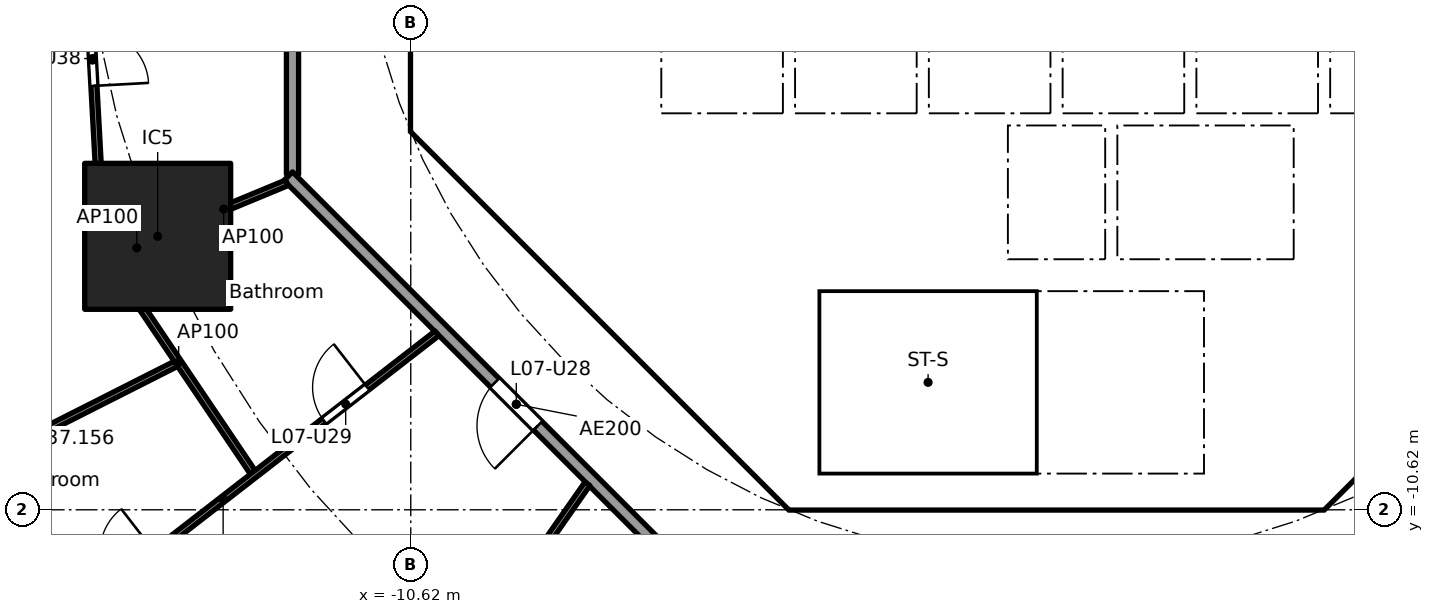
"""IFC4 building model, lengths in metres.
Left out: names, types, materials, properties, quantities, classifications, styles, units other than length and angle.
Written with IfcOpenShell. Run it as: python <this file> out.ifc"""

import sys

from ifc_helpers import new_model, si_unit, direction, frame, frame_2d, origin, origin_2d, place, context, subcontext, project, spatial, polyline, rectangle, outline, extrude, element, fill, save


model = new_model("IFC4")
c1 = context("Model", 3, precision=1e-05, world=origin(), true_north=direction((0.0, 1.0)))
c2 = subcontext(c1, "Body", "Model", "MODEL_VIEW")
j1 = project(units=[si_unit("LENGTHUNIT", "METRE"), si_unit("PLANEANGLEUNIT", "RADIAN")], contexts=[c1])
p1 = place(None, origin())
s1 = spatial("IfcSite", under=j1, at=p1, CompositionType="ELEMENT")
p2 = place(p1, origin())
s2 = spatial("IfcBuilding", under=s1, at=p2, CompositionType="ELEMENT")
p3 = place(p2, frame((0.0, 0.0, 34.4)))
s3 = spatial("IfcBuildingStorey", under=s2, at=p3, CompositionType="ELEMENT", Elevation=34.4)
p4 = place(p3, frame((-14.782, -6.123, 0.0), z_axis=(0.0, 0.0, 1.0), x_axis=(1.0, 0.0, 0.0)))
e1 = element("IfcColumn", 1, at=p4, inside=s3, PredefinedType="COLUMN", context=c2, shape_type="SweptSolid", body=[
    extrude(rectangle(XDim=2.4, YDim=2.4, at=origin_2d()), origin(), (0.0, 0.0, 1.0), 3.7),
])
p5 = place(p3, frame((-10.325, 3.801, 0.0), z_axis=(0.0, 0.0, 1.0), x_axis=(0.0, -1.0, 0.0)))
e2 = element("IfcWall", 2, at=p5, inside=s3, PredefinedType="SHEAR", context=c2, shape_type="SweptSolid", body=[
    extrude(rectangle(XDim=7.602, YDim=0.6, at=frame_2d((3.801, 0.0))), origin(), (0.0, 0.0, 1.0), 3.44),
])
p6 = place(p5, frame((0.651, 0.0, 0.0)))
e3 = element("IfcOpeningElement", 3, at=p6, cuts=e2, PredefinedType="OPENING", context=c2, shape_type="SweptSolid", body=[
    extrude(rectangle(XDim=1.5, YDim=2.1, at=frame_2d((0.75, 1.05))), frame((0.0, 0.31, 0.0), z_axis=(0.0, -1.0, 0.0), x_axis=(1.0, 0.0, 0.0)), (0.0, 0.0, 1.0), 0.62),
])
p7 = place(p5, frame((5.451, 0.0, 0.0)))
e4 = element("IfcOpeningElement", 4, at=p7, cuts=e2, PredefinedType="OPENING", context=c2, shape_type="SweptSolid", body=[
    extrude(rectangle(XDim=1.5, YDim=2.1, at=frame_2d((0.75, 1.05))), frame((0.0, 0.31, 0.0), z_axis=(0.0, -1.0, 0.0), x_axis=(1.0, 0.0, 0.0)), (0.0, 0.0, 1.0), 0.62),
])
p8 = place(p3, frame((-9.988, -4.613, 0.0), z_axis=(0.0, 0.0, 1.0), x_axis=(0.707106781187, -0.707106781187, 0.0)))
e5 = element("IfcWall", 5, at=p8, inside=s3, PredefinedType="SHEAR", context=c2, shape_type="SweptSolid", body=[
    extrude(rectangle(XDim=7.602, YDim=0.6, at=frame_2d((3.801, 0.0))), origin(), (0.0, 0.0, 1.0), 3.44),
])
p9 = place(p8, frame((6.151, 0.0, 0.0)))
e6 = element("IfcOpeningElement", 6, at=p9, cuts=e5, PredefinedType="OPENING", context=c2, shape_type="SweptSolid", body=[
    extrude(rectangle(XDim=1.1, YDim=2.1, at=frame_2d((0.55, 1.05))), frame((0.0, 0.31, 0.0), z_axis=(0.0, -1.0, 0.0), x_axis=(1.0, 0.0, 0.0)), (0.0, 0.0, 1.0), 0.62),
])
p10 = place(p3, frame((4.613, -9.988, 0.0), z_axis=(0.0, 0.0, 1.0), x_axis=(0.707106781187, 0.707106781187, 0.0)))
e7 = element("IfcWall", 7, at=p10, inside=s3, PredefinedType="SHEAR", context=c2, shape_type="SweptSolid", body=[
    extrude(rectangle(XDim=7.602, YDim=0.6, at=frame_2d((3.801, 0.0))), origin(), (0.0, 0.0, 1.0), 3.44),
])
p11 = place(p10, frame((3.201, 0.0, 0.0)))
e8 = element("IfcOpeningElement", 8, at=p11, cuts=e7, PredefinedType="OPENING", context=c2, shape_type="SweptSolid", body=[
    extrude(rectangle(XDim=1.2, YDim=2.1, at=frame_2d((0.6, 1.05))), frame((0.0, 0.31, 0.0), z_axis=(0.0, -1.0, 0.0), x_axis=(1.0, 0.0, 0.0)), (0.0, 0.0, 1.0), 0.62),
])
p12 = place(p3, frame((4.0, -10.025, 0.0), z_axis=(0.0, 0.0, 1.0), x_axis=(0.0, 1.0, 0.0)))
e9 = element("IfcWall", 9, at=p12, inside=s3, PredefinedType="SOLIDWALL", context=c2, shape_type="SweptSolid", body=[
    extrude(rectangle(XDim=3.0, YDim=0.2, at=frame_2d((1.5, 0.0))), origin(), (0.0, 0.0, 1.0), 3.44),
])
p13 = place(p12, frame((0.975, 0.0, 0.0)))
e10 = element("IfcOpeningElement", 10, at=p13, cuts=e9, PredefinedType="OPENING", context=c2, shape_type="SweptSolid", body=[
    extrude(rectangle(XDim=1.1, YDim=2.1, at=frame_2d((0.55, 1.05))), frame((0.0, 0.11, 0.0), z_axis=(0.0, -1.0, 0.0), x_axis=(1.0, 0.0, 0.0)), (0.0, 0.0, 1.0), 0.22),
])
p14 = place(p3, frame((-6.2, -7.827, 0.0), z_axis=(0.0, 0.0, 1.0), x_axis=(0.0, 1.0, 0.0)))
e11 = element("IfcWall", 11, at=p14, inside=s3, PredefinedType="PARTITIONING", context=c2, shape_type="SweptSolid", body=[
    extrude(rectangle(XDim=3.527, YDim=0.15, at=frame_2d((1.763, 0.0))), origin(), (0.0, 0.0, 1.0), 3.44),
])
p15 = place(p14, frame((2.365, 0.0, 0.0)))
e12 = element("IfcOpeningElement", 12, at=p15, cuts=e11, PredefinedType="OPENING", context=c2, shape_type="SweptSolid", body=[
    extrude(rectangle(XDim=0.9, YDim=2.1, at=frame_2d((0.45, 1.05))), frame((0.0, 0.085, 0.0), z_axis=(0.0, -1.0, 0.0), x_axis=(1.0, 0.0, 0.0)), (0.0, 0.0, 1.0), 0.17),
])
p16 = place(p14, frame((0.489, 0.0, 0.0)))
e13 = element("IfcOpeningElement", 13, at=p16, cuts=e11, PredefinedType="OPENING", context=c2, shape_type="SweptSolid", body=[
    extrude(rectangle(XDim=0.9, YDim=2.1, at=frame_2d((0.45, 1.05))), frame((0.0, 0.085, 0.0), z_axis=(0.0, -1.0, 0.0), x_axis=(1.0, 0.0, 0.0)), (0.0, 0.0, 1.0), 0.17),
])
p17 = place(p3, frame((4.0, -6.5, 0.0), z_axis=(0.0, 0.0, 1.0), x_axis=(0.0, 1.0, 0.0)))
e14 = element("IfcWall", 14, at=p17, inside=s3, PredefinedType="SOLIDWALL", context=c2, shape_type="SweptSolid", body=[
    extrude(rectangle(XDim=2.2, YDim=0.2, at=frame_2d((1.1, 0.0))), origin(), (0.0, 0.0, 1.0), 3.44),
])
p18 = place(p17, frame((0.55, 0.0, 0.0)))
e15 = element("IfcOpeningElement", 15, at=p18, cuts=e14, PredefinedType="OPENING", context=c2, shape_type="SweptSolid", body=[
    extrude(rectangle(XDim=1.1, YDim=2.1, at=frame_2d((0.55, 1.05))), frame((0.0, 0.11, 0.0), z_axis=(0.0, -1.0, 0.0), x_axis=(1.0, 0.0, 0.0)), (0.0, 0.0, 1.0), 0.22),
])
p19 = place(p3, frame((-4.0, -6.5, 0.0), z_axis=(0.0, 0.0, 1.0), x_axis=(0.0, 1.0, 0.0)))
e16 = element("IfcWall", 16, at=p19, inside=s3, PredefinedType="SOLIDWALL", context=c2, shape_type="SweptSolid", body=[
    extrude(rectangle(XDim=2.2, YDim=0.2, at=frame_2d((1.1, 0.0))), origin(), (0.0, 0.0, 1.0), 3.44),
])
p20 = place(p19, frame((0.65, 0.0, 0.0)))
e17 = element("IfcOpeningElement", 17, at=p20, cuts=e16, PredefinedType="OPENING", context=c2, shape_type="SweptSolid", body=[
    extrude(rectangle(XDim=0.9, YDim=2.1, at=frame_2d((0.45, 1.05))), frame((0.0, 0.11, 0.0), z_axis=(0.0, -1.0, 0.0), x_axis=(1.0, 0.0, 0.0)), (0.0, 0.0, 1.0), 0.22),
])
p21 = place(p3, origin())
e18 = element("IfcWall", 18, at=p21, inside=s3, PredefinedType="SHEAR", context=c2, shape_type="SweptSolid", body=[
    extrude(outline(polyline([(-10.625, -3.801), (-10.025, -3.801), (-10.025, -4.152), (-9.776, -4.401), (-10.2, -4.825), (-10.625, -4.401), (-10.625, -3.801)])), origin(), (0.0, 0.0, 1.0), 3.44),
])
p22 = place(p3, origin())
e19 = element("IfcWall", 19, at=p22, inside=s3, PredefinedType="SHEAR", context=c2, shape_type="SweptSolid", body=[
    extrude(outline(polyline([(-4.152, -10.025), (4.152, -10.025), (4.401, -9.776), (4.825, -10.2), (4.401, -10.625), (-4.401, -10.625), (-4.825, -10.2), (-4.401, -9.776), (-4.152, -10.025)])), origin(), (0.0, 0.0, 1.0), 3.44),
])
p23 = place(p3, frame((-10.025, -4.0, 0.0), z_axis=(0.0, 0.0, 1.0), x_axis=(1.0, 0.0, 0.0)))
e20 = element("IfcWall", 20, at=p23, inside=s3, PredefinedType="PARTITIONING", context=c2, shape_type="SweptSolid", body=[
    extrude(rectangle(XDim=3.325, YDim=0.2, at=frame_2d((1.662, 0.0))), origin(), (0.0, 0.0, 1.0), 3.44),
])
p24 = place(p3, frame((-8.301, -5.8, 0.0), z_axis=(0.0, 0.0, 1.0), x_axis=(1.0, 0.0, 0.0)))
e21 = element("IfcWall", 21, at=p24, inside=s3, PredefinedType="PARTITIONING", context=c2, shape_type="SweptSolid", body=[
    extrude(rectangle(XDim=2.026, YDim=0.15, at=frame_2d((1.013, 0.0))), origin(), (0.0, 0.0, 1.0), 3.44),
])
for number, where, z_axis, x_axis in (
    (22, (-0.9, -6.5, 0.0), (0.0, 0.0, 1.0), (0.0, 1.0, 0.0)),
    (23, (0.9, -6.5, 0.0), (0.0, 0.0, 1.0), (0.0, 1.0, 0.0)),
):
    element("IfcWall", number, at=place(p3, frame(where, z_axis=z_axis, x_axis=x_axis)), inside=s3, PredefinedType="SOLIDWALL", context=c2, shape_type="SweptSolid", body=[
        extrude(rectangle(XDim=2.2, YDim=0.2, at=frame_2d((1.1, 0.0))), origin(), (0.0, 0.0, 1.0), 3.44),
    ])
p25 = place(p3, origin())
e24 = element("IfcWall", 24, at=p25, inside=s3, PredefinedType="SOLIDWALL", context=c2, shape_type="SweptSolid", body=[
    extrude(outline(polyline([(-6.7, -2.1), (-6.5, -2.1), (-6.5, -4.1), (-4.5, -4.1), (-4.5, -2.1), (-4.3, -2.1), (-4.3, -4.1), (-2.3, -4.1), (-2.3, -2.1), (-2.1, -2.1), (-2.1, -4.1), (-0.1, -4.1), (-0.1, -2.1), (0.1, -2.1), (0.1, -4.1), (2.1, -4.1), (2.1, -2.1), (2.3, -2.1), (2.3, -4.1), (4.3, -4.1), (4.3, -2.1), (4.5, -2.1), (4.5, -4.1), (6.5, -4.1), (6.5, -2.1), (6.7, -2.1), (6.7, -4.3), (-6.7, -4.3), (-6.7, -2.1)])), origin(), (0.0, 0.0, 1.0), 3.44),
])
p26 = place(p3, origin())
e25 = element("IfcWall", 25, at=p26, inside=s3, PredefinedType="SOLIDWALL", context=c2, shape_type="SweptSolid", body=[
    extrude(outline(polyline([(-3.9, -10.025), (-4.1, -10.025), (-4.1, -7.025), (-3.9, -7.025), (-3.9, -10.025)])), origin(), (0.0, 0.0, 1.0), 3.44),
])
p27 = place(p3, origin())
e26 = element("IfcWall", 26, at=p27, inside=s3, PredefinedType="SOLIDWALL", context=c2, shape_type="SweptSolid", body=[
    extrude(outline(polyline([(4.1, -7.025), (-4.1, -7.025), (-4.1, -6.5), (4.1, -6.5), (4.1, -7.025)])), origin(), (0.0, 0.0, 1.0), 3.44),
])
p28 = place(p3, frame((-12.565, 5.304, 0.0), z_axis=(0.0, 0.0, 1.0), x_axis=(0.0, -1.0, 0.0)))
e27 = element("IfcWall", 27, at=p28, inside=s3, PredefinedType="PARTITIONING", context=c2, shape_type="SweptSolid", body=[
    extrude(rectangle(XDim=10.409, YDim=0.2, at=frame_2d((5.205, 0.0))), origin(), (0.0, 0.0, 1.0), 3.44),
])
p29 = place(p3, frame((-12.635, -5.134, 0.0), z_axis=(0.0, 0.0, 1.0), x_axis=(0.707106781187, -0.707106781187, 0.0)))
e28 = element("IfcWall", 28, at=p29, inside=s3, PredefinedType="PARTITIONING", context=c2, shape_type="SweptSolid", body=[
    extrude(rectangle(XDim=10.609, YDim=0.2, at=frame_2d((5.305, 0.0))), origin(), (0.0, 0.0, 1.0), 3.44),
])
p30 = place(p29, frame((4.804, 0.0, 0.0)))
e29 = element("IfcOpeningElement", 29, at=p30, cuts=e28, PredefinedType="OPENING", context=c2, shape_type="SweptSolid", body=[
    extrude(rectangle(XDim=1.0, YDim=2.1, at=frame_2d((0.5, 1.05))), frame((0.0, 0.11, 0.0), z_axis=(0.0, -1.0, 0.0), x_axis=(1.0, 0.0, 0.0)), (0.0, 0.0, 1.0), 0.22),
])
p31 = place(p3, frame((-16.028, -0.05, 0.0), z_axis=(0.0, 0.0, 1.0), x_axis=(0.054636410342, -0.998506315786, 0.0)))
e30 = element("IfcWall", 30, at=p31, inside=s3, PredefinedType="PARTITIONING", context=c2, shape_type="SweptSolid", body=[
    extrude(rectangle(XDim=6.359, YDim=0.1, at=frame_2d((3.179, 0.0))), origin(), (0.0, 0.0, 1.0), 2.756),
])
p32 = place(p31, frame((2.704, 0.0, 0.0)))
e31 = element("IfcOpeningElement", 31, at=p32, cuts=e30, PredefinedType="OPENING", context=c2, shape_type="SweptSolid", body=[
    extrude(rectangle(XDim=0.9, YDim=2.1, at=frame_2d((0.45, 1.05))), frame((0.0, 0.06, 0.0), z_axis=(0.0, -1.0, 0.0), x_axis=(1.0, 0.0, 0.0)), (0.0, 0.0, 1.0), 0.12),
])
p33 = place(p3, frame((-12.657, -5.243, 0.0), z_axis=(0.0, 0.0, 1.0), x_axis=(-0.923864733477, -0.382719158442, 0.0)))
e32 = element("IfcWall", 32, at=p33, inside=s3, PredefinedType="PARTITIONING", context=c2, shape_type="SweptSolid", body=[
    extrude(rectangle(XDim=2.25, YDim=0.1, at=frame_2d((1.125, 0.0))), origin(), (0.0, 0.0, 1.0), 3.44),
])
p34 = place(p3, frame((-15.655, -6.391, 0.0), z_axis=(0.0, 0.0, 1.0), x_axis=(0.559126445155, -0.82908239538, 0.0)))
e33 = element("IfcWall", 33, at=p34, inside=s3, PredefinedType="PARTITIONING", context=c2, shape_type="SweptSolid", body=[
    extrude(rectangle(XDim=4.358, YDim=0.1, at=frame_2d((2.179, 0.0))), origin(), (0.0, 0.0, 1.0), 3.44),
])
p35 = place(p3, frame((-14.481, -8.22, 0.0), z_axis=(0.0, 0.0, 1.0), x_axis=(-0.892232077638, -0.451577146935, 0.0)))
e34 = element("IfcWall", 34, at=p35, inside=s3, PredefinedType="PARTITIONING", context=c2, shape_type="SweptSolid", body=[
    extrude(rectangle(XDim=9.723, YDim=0.1, at=frame_2d((4.862, 0.0))), origin(), (0.0, 0.0, 1.0), 2.837),
])
p36 = place(p35, frame((6.678, 0.0, 0.0)))
e35 = element("IfcOpeningElement", 35, at=p36, cuts=e34, PredefinedType="OPENING", context=c2, shape_type="SweptSolid", body=[
    extrude(rectangle(XDim=0.9, YDim=2.1, at=frame_2d((0.45, 1.05))), frame((0.0, 0.06, 0.0), z_axis=(0.0, -1.0, 0.0), x_axis=(1.0, 0.0, 0.0)), (0.0, 0.0, 1.0), 0.12),
])
p37 = place(p3, frame((-10.19, -7.719, 0.0), z_axis=(0.0, 0.0, 1.0), x_axis=(-0.790264549439, -0.612765813259, 0.0)))
e36 = element("IfcWall", 36, at=p37, inside=s3, PredefinedType="PARTITIONING", context=c2, shape_type="SweptSolid", body=[
    extrude(rectangle(XDim=8.896, YDim=0.1, at=frame_2d((4.448, 0.0))), origin(), (0.0, 0.0, 1.0), 2.687),
])
p38 = place(p37, frame((1.448, 0.0, 0.0)))
e37 = element("IfcOpeningElement", 37, at=p38, cuts=e36, PredefinedType="OPENING", context=c2, shape_type="SweptSolid", body=[
    extrude(rectangle(XDim=0.9, YDim=2.1, at=frame_2d((0.45, 1.05))), frame((0.0, 0.06, 0.0), z_axis=(0.0, -1.0, 0.0), x_axis=(1.0, 0.0, 0.0)), (0.0, 0.0, 1.0), 0.12),
])
p39 = place(p37, frame((5.871, 0.0, 0.0)))
e38 = element("IfcOpeningElement", 38, at=p39, cuts=e36, PredefinedType="OPENING", context=c2, shape_type="SweptSolid", body=[
    extrude(rectangle(XDim=0.9, YDim=2.1, at=frame_2d((0.45, 1.05))), frame((0.0, 0.06, 0.0), z_axis=(0.0, -1.0, 0.0), x_axis=(1.0, 0.0, 0.0)), (0.0, 0.0, 1.0), 0.12),
])
p40 = place(p3, frame((-7.715, -10.193, 0.0), z_axis=(0.0, 0.0, 1.0), x_axis=(-0.573126964124, -0.819466584428, 0.0)))
e39 = element("IfcWall", 39, at=p40, inside=s3, PredefinedType="PARTITIONING", context=c2, shape_type="SweptSolid", body=[
    extrude(rectangle(XDim=15.001, YDim=0.1, at=frame_2d((7.5, 0.0))), origin(), (0.0, 0.0, 1.0), 2.687),
])
p41 = place(p40, frame((1.678, 0.0, 0.0)))
e40 = element("IfcOpeningElement", 40, at=p41, cuts=e39, PredefinedType="OPENING", context=c2, shape_type="SweptSolid", body=[
    extrude(rectangle(XDim=0.9, YDim=2.1, at=frame_2d((0.45, 1.05))), frame((0.0, 0.06, 0.0), z_axis=(0.0, -1.0, 0.0), x_axis=(1.0, 0.0, 0.0)), (0.0, 0.0, 1.0), 0.12),
])
p42 = place(p40, frame((6.631, 0.0, 0.0)))
e41 = element("IfcOpeningElement", 41, at=p42, cuts=e39, PredefinedType="OPENING", context=c2, shape_type="SweptSolid", body=[
    extrude(rectangle(XDim=0.9, YDim=2.1, at=frame_2d((0.45, 1.05))), frame((0.0, 0.06, 0.0), z_axis=(0.0, -1.0, 0.0), x_axis=(1.0, 0.0, 0.0)), (0.0, 0.0, 1.0), 0.12),
])
p43 = place(p3, frame((-15.469, -6.398, 0.0), z_axis=(0.0, 0.0, 1.0), x_axis=(0.969858002632, 0.243670791706, 0.0)))
e42 = element("IfcWall", 42, at=p43, inside=s3, PredefinedType="PARTITIONING", context=c2, shape_type="SweptSolid", body=[
    extrude(rectangle(XDim=0.708, YDim=0.1, at=frame_2d((0.354, 0.0))), origin(), (0.0, 0.0, 1.0), 3.44),
])
p44 = place(p18, origin())
e43 = element("IfcDoor", 43, at=p44, inside=s3, OperationType="DOUBLE_DOOR_SLIDING", PredefinedType="DOOR", context=c2, shape_type="SweptSolid", body=[
    extrude(rectangle(XDim=1.1, YDim=2.1, at=frame_2d((0.55, 1.05))), frame((0.0, 0.025, 0.0), z_axis=(0.0, -1.0, 0.0), x_axis=(1.0, 0.0, 0.0)), (0.0, 0.0, 1.0), 0.05),
])
fill(e15, e43)
p45 = place(p13, origin())
e44 = element("IfcDoor", 44, at=p45, inside=s3, OperationType="SINGLE_SWING_RIGHT", PredefinedType="DOOR", context=c2, shape_type="SweptSolid", body=[
    extrude(rectangle(XDim=1.1, YDim=2.1, at=frame_2d((0.55, 1.05))), frame((0.0, 0.025, 0.0), z_axis=(0.0, -1.0, 0.0), x_axis=(1.0, 0.0, 0.0)), (0.0, 0.0, 1.0), 0.05),
])
fill(e10, e44)
p46 = place(p15, origin())
e45 = element("IfcDoor", 45, at=p46, inside=s3, OperationType="SINGLE_SWING_RIGHT", PredefinedType="DOOR", context=c2, shape_type="SweptSolid", body=[
    extrude(rectangle(XDim=0.9, YDim=2.1, at=frame_2d((0.45, 1.05))), frame((0.0, 0.025, 0.0), z_axis=(0.0, -1.0, 0.0), x_axis=(1.0, 0.0, 0.0)), (0.0, 0.0, 1.0), 0.05),
])
fill(e12, e45)
p47 = place(p16, origin())
e46 = element("IfcDoor", 46, at=p47, inside=s3, OperationType="SINGLE_SWING_RIGHT", PredefinedType="DOOR", context=c2, shape_type="SweptSolid", body=[
    extrude(rectangle(XDim=0.9, YDim=2.1, at=frame_2d((0.45, 1.05))), frame((0.0, 0.025, 0.0), z_axis=(0.0, -1.0, 0.0), x_axis=(1.0, 0.0, 0.0)), (0.0, 0.0, 1.0), 0.05),
])
fill(e13, e46)
p48 = place(p20, frame((0.9, 0.0, 0.0), x_axis=(-1.0, 0.0, 0.0)))
e47 = element("IfcDoor", 47, at=p48, inside=s3, OperationType="SINGLE_SWING_LEFT", PredefinedType="DOOR", context=c2, shape_type="SweptSolid", body=[
    extrude(rectangle(XDim=0.9, YDim=2.1, at=frame_2d((0.45, 1.05))), frame((0.0, 0.025, 0.0), z_axis=(0.0, -1.0, 0.0), x_axis=(1.0, 0.0, 0.0)), (0.0, 0.0, 1.0), 0.05),
])
fill(e17, e47)
p49 = place(p7, origin())
e48 = element("IfcDoor", 48, at=p49, inside=s3, OperationType="DOUBLE_DOOR_SINGLE_SWING", PredefinedType="DOOR", context=c2, shape_type="SweptSolid", body=[
    extrude(rectangle(XDim=1.5, YDim=2.1, at=frame_2d((0.75, 1.05))), frame((0.0, 0.025, 0.0), z_axis=(0.0, -1.0, 0.0), x_axis=(1.0, 0.0, 0.0)), (0.0, 0.0, 1.0), 0.05),
])
fill(e4, e48)
p50 = place(p9, origin())
e49 = element("IfcDoor", 49, at=p50, inside=s3, OperationType="SINGLE_SWING_RIGHT", PredefinedType="DOOR", context=c2, shape_type="SweptSolid", body=[
    extrude(rectangle(XDim=1.1, YDim=2.1, at=frame_2d((0.55, 1.05))), frame((0.0, 0.025, 0.0), z_axis=(0.0, -1.0, 0.0), x_axis=(1.0, 0.0, 0.0)), (0.0, 0.0, 1.0), 0.05),
])
fill(e6, e49)
p51 = place(p30, frame((1.0, 0.0, 0.0), x_axis=(-1.0, 0.0, 0.0)))
e50 = element("IfcDoor", 50, at=p51, inside=s3, OperationType="SINGLE_SWING_LEFT", PredefinedType="DOOR", context=c2, shape_type="SweptSolid", body=[
    extrude(rectangle(XDim=1.0, YDim=2.1, at=frame_2d((0.5, 1.05))), frame((0.0, 0.025, 0.0), z_axis=(0.0, -1.0, 0.0), x_axis=(1.0, 0.0, 0.0)), (0.0, 0.0, 1.0), 0.05),
])
fill(e29, e50)
p52 = place(p38, frame((0.9, 0.0, 0.0), x_axis=(-1.0, 0.0, 0.0)))
e51 = element("IfcDoor", 51, at=p52, inside=s3, OperationType="SINGLE_SWING_RIGHT", PredefinedType="DOOR", context=c2, shape_type="SweptSolid", body=[
    extrude(rectangle(XDim=0.9, YDim=2.1, at=frame_2d((0.45, 1.05))), frame((0.0, 0.025, 0.0), z_axis=(0.0, -1.0, 0.0), x_axis=(1.0, 0.0, 0.0)), (0.0, 0.0, 1.0), 0.05),
])
fill(e37, e51)
p53 = place(p32, origin())
e52 = element("IfcDoor", 52, at=p53, inside=s3, OperationType="SINGLE_SWING_RIGHT", PredefinedType="DOOR", context=c2, shape_type="SweptSolid", body=[
    extrude(rectangle(XDim=0.9, YDim=2.1, at=frame_2d((0.45, 1.05))), frame((0.0, 0.025, 0.0), z_axis=(0.0, -1.0, 0.0), x_axis=(1.0, 0.0, 0.0)), (0.0, 0.0, 1.0), 0.05),
])
fill(e31, e52)
save(model, sys.argv[1])
